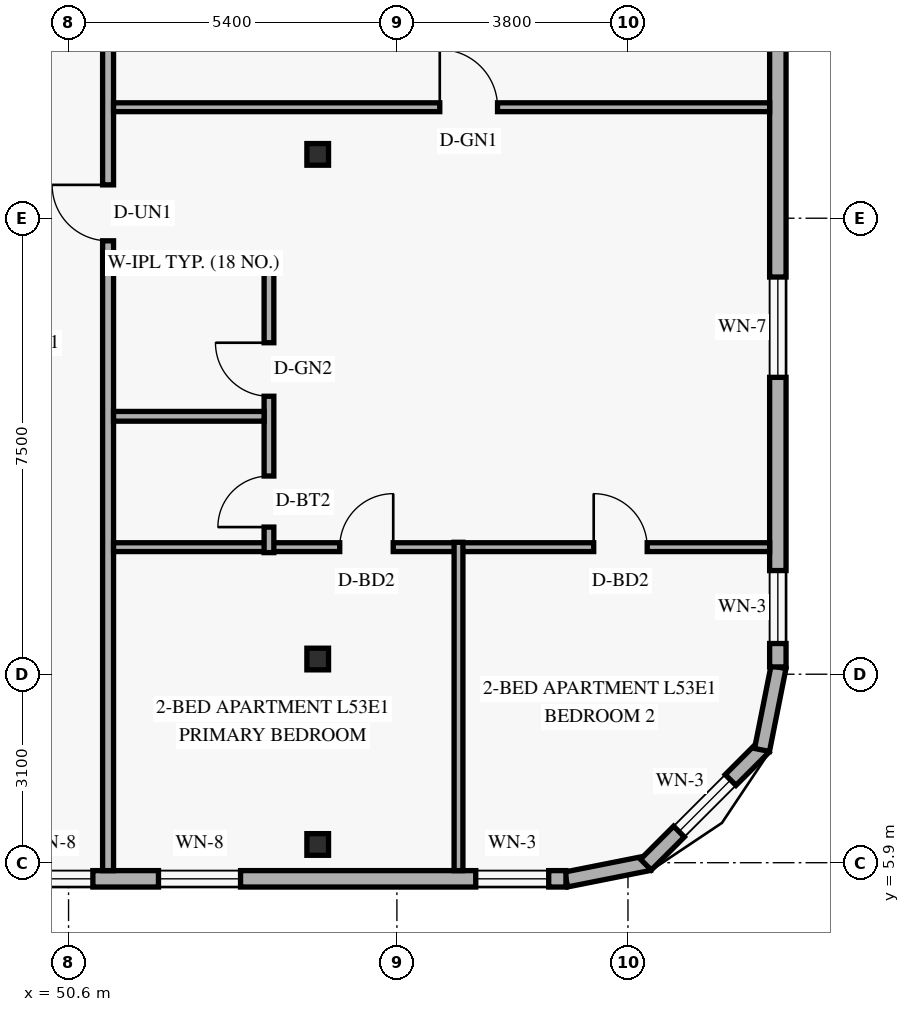
"""IFC4 building model, lengths in metres.
Left out: names, types, materials, properties, quantities, classifications, styles, units other than length and angle.
Written with IfcOpenShell. Run it as: python <this file> out.ifc"""

import sys

from ifc_helpers import new_model, si_unit, direction, frame, frame_2d, origin, origin_2d, place, context, subcontext, project, spatial, rectangle, hollow_rectangle, extrude, element, fill, save


model = new_model("IFC4")
c1 = context("Model", 3, precision=1e-05, world=origin(), true_north=direction((0.0, 1.0)))
c2 = subcontext(c1, "Body", "Model", "MODEL_VIEW")
j1 = project(units=[si_unit("LENGTHUNIT", "METRE"), si_unit("PLANEANGLEUNIT", "RADIAN")], contexts=[c1])
p1 = place(None, origin())
s1 = spatial("IfcSite", under=j1, at=p1, CompositionType="ELEMENT")
p2 = place(p1, origin())
s2 = spatial("IfcBuilding", under=s1, at=p2, CompositionType="ELEMENT")
p3 = place(p2, frame((0.0, 0.0, 205.8)))
s3 = spatial("IfcBuildingStorey", under=s2, at=p3, CompositionType="ELEMENT", Elevation=205.8)
for number, where, z_axis, x_axis in (
    (1, (54.593, 6.2, 0.0), (0.058, 0.0, 0.998), (0.0, 1.0, 0.0)),
    (2, (54.593, 9.25, 0.0), (0.058, 0.0, 0.998), (0.0, 1.0, 0.0)),
    (3, (54.593, 17.55, 0.0), (0.058, 0.0, 0.998), (0.0, 1.0, 0.0)),
):
    element("IfcColumn", number, at=place(p3, frame(where, z_axis=z_axis, x_axis=x_axis)), inside=s3, PredefinedType="COLUMN", context=c2, shape_type="SweptSolid", body=[
        extrude(hollow_rectangle(XDim=0.356, YDim=0.356, WallThickness=0.016, at=origin_2d()), origin(), (0.0, 0.0, 1.0), 3.606),
    ])
p4 = place(p3, frame((58.783, 5.624, 0.0), z_axis=(0.0, 0.0, 1.0), x_axis=(0.980809899341, 0.19496651342, 0.0)))
e4 = element("IfcWall", 4, at=p4, inside=s3, PredefinedType="SOLIDWALL", context=c2, shape_type="SweptSolid", body=[
    extrude(rectangle(XDim=1.389, YDim=0.25, at=frame_2d((0.694, 0.0))), origin(), (0.0, 0.0, 1.0), 3.36),
])
p5 = place(p3, frame((60.095, 5.868, 0.0), z_axis=(0.0, 0.0, 1.0), x_axis=(0.707106781187, 0.707106781187, 0.0)))
e5 = element("IfcWall", 5, at=p5, inside=s3, PredefinedType="SOLIDWALL", context=c2, shape_type="SweptSolid", body=[
    extrude(rectangle(XDim=2.739, YDim=0.25, at=frame_2d((1.37, 0.0))), origin(), (0.0, 0.0, 1.0), 3.36),
])
p6 = place(p5, frame((0.77, 0.0, 0.85)))
e6 = element("IfcOpeningElement", 6, at=p6, cuts=e5, PredefinedType="OPENING", context=c2, shape_type="SweptSolid", body=[
    extrude(rectangle(XDim=1.2, YDim=1.5, at=frame_2d((0.6, 0.75))), frame((0.0, 0.135, 0.0), z_axis=(0.0, -1.0, 0.0), x_axis=(1.0, 0.0, 0.0)), (0.0, 0.0, 1.0), 0.27),
])
p7 = place(p3, frame((62.005, 7.754, 0.0), z_axis=(0.0, 0.0, 1.0), x_axis=(0.195135625965, 0.9807762678, 0.0)))
e7 = element("IfcWall", 7, at=p7, inside=s3, PredefinedType="SOLIDWALL", context=c2, shape_type="SweptSolid", body=[
    extrude(rectangle(XDim=1.389, YDim=0.25, at=frame_2d((0.694, 0.0))), origin(), (0.0, 0.0, 1.0), 3.36),
])
p8 = place(p3, frame((25.82, 5.635, 0.0), z_axis=(0.0, 0.0, 1.0), x_axis=(1.0, 0.0, 0.0)))
e8 = element("IfcWall", 8, at=p8, inside=s3, PredefinedType="SOLIDWALL", context=c2, shape_type="SweptSolid", body=[
    extrude(rectangle(XDim=32.96, YDim=0.27, at=frame_2d((16.48, 0.0))), origin(), (0.0, 0.0, 1.0), 3.36),
])
p9 = place(p8, frame((3.795, 0.0, 0.85)))
e9 = element("IfcOpeningElement", 9, at=p9, cuts=e8, PredefinedType="OPENING", context=c2, shape_type="SweptSolid", body=[
    extrude(rectangle(XDim=1.35, YDim=1.55, at=frame_2d((0.675, 0.775))), frame((0.0, 0.145, 0.0), z_axis=(0.0, -1.0, 0.0), x_axis=(1.0, 0.0, 0.0)), (0.0, 0.0, 1.0), 0.29),
])
p10 = place(p8, frame((15.661, 0.0, 0.85)))
e10 = element("IfcOpeningElement", 10, at=p10, cuts=e8, PredefinedType="OPENING", context=c2, shape_type="SweptSolid", body=[
    extrude(rectangle(XDim=1.35, YDim=1.55, at=frame_2d((0.675, 0.775))), frame((0.0, 0.145, 0.0), z_axis=(0.0, -1.0, 0.0), x_axis=(1.0, 0.0, 0.0)), (0.0, 0.0, 1.0), 0.29),
])
p11 = place(p8, frame((23.83, 0.0, 0.85)))
e11 = element("IfcOpeningElement", 11, at=p11, cuts=e8, PredefinedType="OPENING", context=c2, shape_type="SweptSolid", body=[
    extrude(rectangle(XDim=1.35, YDim=1.55, at=frame_2d((0.675, 0.775))), frame((0.0, 0.145, 0.0), z_axis=(0.0, -1.0, 0.0), x_axis=(1.0, 0.0, 0.0)), (0.0, 0.0, 1.0), 0.29),
])
p12 = place(p8, frame((26.259, 0.0, 0.85)))
e12 = element("IfcOpeningElement", 12, at=p12, cuts=e8, PredefinedType="OPENING", context=c2, shape_type="SweptSolid", body=[
    extrude(rectangle(XDim=1.35, YDim=1.55, at=frame_2d((0.675, 0.775))), frame((0.0, 0.145, 0.0), z_axis=(0.0, -1.0, 0.0), x_axis=(1.0, 0.0, 0.0)), (0.0, 0.0, 1.0), 0.29),
])
p13 = place(p8, frame((31.477, 0.0, 0.85)))
e13 = element("IfcOpeningElement", 13, at=p13, cuts=e8, PredefinedType="OPENING", context=c2, shape_type="SweptSolid", body=[
    extrude(rectangle(XDim=1.2, YDim=1.5, at=frame_2d((0.6, 0.75))), frame((0.0, 0.145, 0.0), z_axis=(0.0, -1.0, 0.0), x_axis=(1.0, 0.0, 0.0)), (0.0, 0.0, 1.0), 0.29),
])
p14 = place(p3, frame((62.265, 9.12, 0.0), z_axis=(0.0, 0.0, 1.0), x_axis=(0.0, 1.0, 0.0)))
e14 = element("IfcWall", 14, at=p14, inside=s3, PredefinedType="SOLIDWALL", context=c2, shape_type="SweptSolid", body=[
    extrude(rectangle(XDim=29.76, YDim=0.27, at=frame_2d((14.88, 0.0))), origin(), (0.0, 0.0, 1.0), 3.36),
])
p15 = place(p14, frame((0.385, 0.0, 0.85)))
e15 = element("IfcOpeningElement", 15, at=p15, cuts=e14, PredefinedType="OPENING", context=c2, shape_type="SweptSolid", body=[
    extrude(rectangle(XDim=1.2, YDim=1.5, at=frame_2d((0.6, 0.75))), frame((0.0, 0.145, 0.0), z_axis=(0.0, -1.0, 0.0), x_axis=(1.0, 0.0, 0.0)), (0.0, 0.0, 1.0), 0.29),
])
p16 = place(p14, frame((4.763, 0.0, 0.85)))
e16 = element("IfcOpeningElement", 16, at=p16, cuts=e14, PredefinedType="OPENING", context=c2, shape_type="SweptSolid", body=[
    extrude(rectangle(XDim=1.65, YDim=1.6, at=frame_2d((0.825, 0.8))), frame((0.0, 0.145, 0.0), z_axis=(0.0, -1.0, 0.0), x_axis=(1.0, 0.0, 0.0)), (0.0, 0.0, 1.0), 0.29),
])
p17 = place(p14, frame((11.218, 0.0, 0.85)))
e17 = element("IfcOpeningElement", 17, at=p17, cuts=e14, PredefinedType="OPENING", context=c2, shape_type="SweptSolid", body=[
    extrude(rectangle(XDim=1.65, YDim=1.6, at=frame_2d((0.825, 0.8))), frame((0.0, 0.145, 0.0), z_axis=(0.0, -1.0, 0.0), x_axis=(1.0, 0.0, 0.0)), (0.0, 0.0, 1.0), 0.29),
])
p18 = place(p14, frame((16.99, 0.0, 0.85)))
e18 = element("IfcOpeningElement", 18, at=p18, cuts=e14, PredefinedType="OPENING", context=c2, shape_type="SweptSolid", body=[
    extrude(rectangle(XDim=1.65, YDim=1.6, at=frame_2d((0.825, 0.8))), frame((0.0, 0.145, 0.0), z_axis=(0.0, -1.0, 0.0), x_axis=(1.0, 0.0, 0.0)), (0.0, 0.0, 1.0), 0.29),
])
p19 = place(p14, frame((24.17, 0.0, 0.85)))
e19 = element("IfcOpeningElement", 19, at=p19, cuts=e14, PredefinedType="OPENING", context=c2, shape_type="SweptSolid", body=[
    extrude(rectangle(XDim=1.65, YDim=1.6, at=frame_2d((0.825, 0.8))), frame((0.0, 0.145, 0.0), z_axis=(0.0, -1.0, 0.0), x_axis=(1.0, 0.0, 0.0)), (0.0, 0.0, 1.0), 0.29),
])
p20 = place(p3, frame((51.25, 5.77, 0.0), z_axis=(0.0, 0.0, 1.0), x_axis=(0.0, 1.0, 0.0)))
e20 = element("IfcWall", 20, at=p20, inside=s3, PredefinedType="STANDARD", context=c2, shape_type="SweptSolid", body=[
    extrude(rectangle(XDim=36.46, YDim=0.18, at=frame_2d((18.23, 0.0))), origin(), (0.0, 0.0, 1.0), 2.803),
])
p21 = place(p20, frame((10.358, 0.0, 0.0)))
e21 = element("IfcOpeningElement", 21, at=p21, cuts=e20, PredefinedType="OPENING", context=c2, shape_type="SweptSolid", body=[
    extrude(rectangle(XDim=0.92, YDim=2.15, at=frame_2d((0.46, 1.075))), frame((0.0, 0.1, 0.0), z_axis=(0.0, -1.0, 0.0), x_axis=(1.0, 0.0, 0.0)), (0.0, 0.0, 1.0), 0.2),
])
p22 = place(p20, frame((26.583, 0.0, 0.0)))
e22 = element("IfcOpeningElement", 22, at=p22, cuts=e20, PredefinedType="OPENING", context=c2, shape_type="SweptSolid", body=[
    extrude(rectangle(XDim=0.92, YDim=2.15, at=frame_2d((0.46, 1.075))), frame((0.0, 0.1, 0.0), z_axis=(0.0, -1.0, 0.0), x_axis=(1.0, 0.0, 0.0)), (0.0, 0.0, 1.0), 0.2),
])
p23 = place(p3, frame((51.34, 11.09, 0.0), z_axis=(0.0, 0.0, 1.0), x_axis=(1.0, 0.0, 0.0)))
e23 = element("IfcWall", 23, at=p23, inside=s3, PredefinedType="PARTITIONING", context=c2, shape_type="SweptSolid", body=[
    extrude(rectangle(XDim=10.79, YDim=0.145, at=frame_2d((5.395, 0.0))), origin(), (0.0, 0.0, 1.0), 2.879),
])
p24 = place(p23, frame((3.719, 0.0, 0.0)))
e24 = element("IfcOpeningElement", 24, at=p24, cuts=e23, PredefinedType="OPENING", context=c2, shape_type="SweptSolid", body=[
    extrude(rectangle(XDim=0.88, YDim=2.14, at=frame_2d((0.44, 1.07))), frame((0.0, 0.083, 0.0), z_axis=(0.0, -1.0, 0.0), x_axis=(1.0, 0.0, 0.0)), (0.0, 0.0, 1.0), 0.165),
])
p25 = place(p23, frame((7.896, 0.0, 0.0)))
e25 = element("IfcOpeningElement", 25, at=p25, cuts=e23, PredefinedType="OPENING", context=c2, shape_type="SweptSolid", body=[
    extrude(rectangle(XDim=0.88, YDim=2.14, at=frame_2d((0.44, 1.07))), frame((0.0, 0.083, 0.0), z_axis=(0.0, -1.0, 0.0), x_axis=(1.0, 0.0, 0.0)), (0.0, 0.0, 1.0), 0.165),
])
p26 = place(p3, frame((51.34, 15.769, 0.0), z_axis=(0.0, 0.0, 1.0), x_axis=(1.0, 0.0, 0.0)))
e26 = element("IfcWall", 26, at=p26, inside=s3, PredefinedType="PLUMBINGWALL", context=c2, shape_type="SweptSolid", body=[
    extrude(rectangle(XDim=2.636, YDim=0.16, at=frame_2d((1.318, 0.0))), origin(), (0.0, 0.0, 1.0), 3.36),
])
p27 = place(p3, frame((53.896, 11.0, 0.0), z_axis=(0.0, 0.0, 1.0), x_axis=(0.0, 1.0, 0.0)))
e27 = element("IfcWall", 27, at=p27, inside=s3, PredefinedType="PLUMBINGWALL", context=c2, shape_type="SweptSolid", body=[
    extrude(rectangle(XDim=4.858, YDim=0.16, at=frame_2d((2.429, 0.0))), origin(), (0.0, 0.0, 1.0), 3.039),
])
p28 = place(p27, frame((0.42, 0.0, 0.0)))
e28 = element("IfcOpeningElement", 28, at=p28, cuts=e27, PredefinedType="OPENING", context=c2, shape_type="SweptSolid", body=[
    extrude(rectangle(XDim=0.84, YDim=2.12, at=frame_2d((0.42, 1.06))), frame((0.0, 0.09, 0.0), z_axis=(0.0, -1.0, 0.0), x_axis=(1.0, 0.0, 0.0)), (0.0, 0.0, 1.0), 0.18),
])
p29 = place(p27, frame((2.572, 0.0, 0.0)))
e29 = element("IfcOpeningElement", 29, at=p29, cuts=e27, PredefinedType="OPENING", context=c2, shape_type="SweptSolid", body=[
    extrude(rectangle(XDim=0.88, YDim=2.12, at=frame_2d((0.44, 1.06))), frame((0.0, 0.09, 0.0), z_axis=(0.0, -1.0, 0.0), x_axis=(1.0, 0.0, 0.0)), (0.0, 0.0, 1.0), 0.18),
])
p30 = place(p3, frame((51.34, 13.242, 0.0), z_axis=(0.0, 0.0, 1.0), x_axis=(1.0, 0.0, 0.0)))
e30 = element("IfcWall", 30, at=p30, inside=s3, PredefinedType="PLUMBINGWALL", context=c2, shape_type="SweptSolid", body=[
    extrude(rectangle(XDim=2.476, YDim=0.16, at=frame_2d((1.238, 0.0))), origin(), (0.0, 0.0, 1.0), 3.36),
])
p31 = place(p3, frame((51.34, 18.326, 0.0), z_axis=(0.0, 0.0, 1.0), x_axis=(1.0, 0.0, 0.0)))
e31 = element("IfcWall", 31, at=p31, inside=s3, PredefinedType="PARTITIONING", context=c2, shape_type="SweptSolid", body=[
    extrude(rectangle(XDim=10.79, YDim=0.145, at=frame_2d((5.395, 0.0))), origin(), (0.0, 0.0, 1.0), 2.879),
])
p32 = place(p31, frame((5.365, 0.0, 0.0)))
e32 = element("IfcOpeningElement", 32, at=p32, cuts=e31, PredefinedType="OPENING", context=c2, shape_type="SweptSolid", body=[
    extrude(rectangle(XDim=0.95, YDim=2.15, at=frame_2d((0.475, 1.075))), frame((0.0, 0.083, 0.0), z_axis=(0.0, -1.0, 0.0), x_axis=(1.0, 0.0, 0.0)), (0.0, 0.0, 1.0), 0.165),
])
p33 = place(p3, frame((57.013, 5.77, 0.0), z_axis=(0.0, 0.0, 1.0), x_axis=(0.0, 1.0, 0.0)))
e33 = element("IfcWall", 33, at=p33, inside=s3, PredefinedType="PARTITIONING", context=c2, shape_type="SweptSolid", body=[
    extrude(rectangle(XDim=5.4, YDim=0.145, at=frame_2d((2.7, 0.0))), origin(), (0.0, 0.0, 1.0), 3.36),
])
p34 = place(p6, origin())
e34 = element("IfcWindow", 34, at=p34, inside=s3, PartitioningType="SINGLE_PANEL", PredefinedType="WINDOW", context=c2, shape_type="SweptSolid", body=[
    extrude(rectangle(XDim=1.2, YDim=1.5, at=frame_2d((0.6, 0.75))), frame((0.0, 0.03, 0.0), z_axis=(0.0, -1.0, 0.0), x_axis=(1.0, 0.0, 0.0)), (0.0, 0.0, 1.0), 0.06),
])
fill(e6, e34)
p35 = place(p11, origin())
e35 = element("IfcWindow", 35, at=p35, inside=s3, PartitioningType="SINGLE_PANEL", PredefinedType="WINDOW", context=c2, shape_type="SweptSolid", body=[
    extrude(rectangle(XDim=1.35, YDim=1.55, at=frame_2d((0.675, 0.775))), frame((0.0, 0.03, 0.0), z_axis=(0.0, -1.0, 0.0), x_axis=(1.0, 0.0, 0.0)), (0.0, 0.0, 1.0), 0.06),
])
fill(e11, e35)
p36 = place(p12, origin())
e36 = element("IfcWindow", 36, at=p36, inside=s3, PartitioningType="SINGLE_PANEL", PredefinedType="WINDOW", context=c2, shape_type="SweptSolid", body=[
    extrude(rectangle(XDim=1.35, YDim=1.55, at=frame_2d((0.675, 0.775))), frame((0.0, 0.03, 0.0), z_axis=(0.0, -1.0, 0.0), x_axis=(1.0, 0.0, 0.0)), (0.0, 0.0, 1.0), 0.06),
])
fill(e12, e36)
p37 = place(p13, origin())
e37 = element("IfcWindow", 37, at=p37, inside=s3, PartitioningType="SINGLE_PANEL", PredefinedType="WINDOW", context=c2, shape_type="SweptSolid", body=[
    extrude(rectangle(XDim=1.2, YDim=1.5, at=frame_2d((0.6, 0.75))), frame((0.0, 0.03, 0.0), z_axis=(0.0, -1.0, 0.0), x_axis=(1.0, 0.0, 0.0)), (0.0, 0.0, 1.0), 0.06),
])
fill(e13, e37)
p38 = place(p15, origin())
e38 = element("IfcWindow", 38, at=p38, inside=s3, PartitioningType="SINGLE_PANEL", PredefinedType="WINDOW", context=c2, shape_type="SweptSolid", body=[
    extrude(rectangle(XDim=1.2, YDim=1.5, at=frame_2d((0.6, 0.75))), frame((0.0, 0.03, 0.0), z_axis=(0.0, -1.0, 0.0), x_axis=(1.0, 0.0, 0.0)), (0.0, 0.0, 1.0), 0.06),
])
fill(e15, e38)
p39 = place(p16, origin())
e39 = element("IfcWindow", 39, at=p39, inside=s3, PartitioningType="SINGLE_PANEL", PredefinedType="WINDOW", context=c2, shape_type="SweptSolid", body=[
    extrude(rectangle(XDim=1.65, YDim=1.6, at=frame_2d((0.825, 0.8))), frame((0.0, 0.03, 0.0), z_axis=(0.0, -1.0, 0.0), x_axis=(1.0, 0.0, 0.0)), (0.0, 0.0, 1.0), 0.06),
])
fill(e16, e39)
p40 = place(p32, origin())
e40 = element("IfcDoor", 40, at=p40, inside=s3, OperationType="SINGLE_SWING_LEFT", PredefinedType="DOOR", context=c2, shape_type="SweptSolid", body=[
    extrude(rectangle(XDim=0.95, YDim=2.15, at=frame_2d((0.475, 1.075))), frame((0.0, 0.025, 0.0), z_axis=(0.0, -1.0, 0.0), x_axis=(1.0, 0.0, 0.0)), (0.0, 0.0, 1.0), 0.05),
])
fill(e32, e40)
p41 = place(p21, origin())
e41 = element("IfcDoor", 41, at=p41, inside=s3, OperationType="SINGLE_SWING_RIGHT", PredefinedType="DOOR", context=c2, shape_type="SweptSolid", body=[
    extrude(rectangle(XDim=0.92, YDim=2.15, at=frame_2d((0.46, 1.075))), frame((0.0, 0.025, 0.0), z_axis=(0.0, -1.0, 0.0), x_axis=(1.0, 0.0, 0.0)), (0.0, 0.0, 1.0), 0.05),
])
fill(e21, e41)
p42 = place(p28, origin())
e42 = element("IfcDoor", 42, at=p42, inside=s3, OperationType="SINGLE_SWING_LEFT", PredefinedType="DOOR", context=c2, shape_type="SweptSolid", body=[
    extrude(rectangle(XDim=0.84, YDim=2.12, at=frame_2d((0.42, 1.06))), frame((0.0, 0.025, 0.0), z_axis=(0.0, -1.0, 0.0), x_axis=(1.0, 0.0, 0.0)), (0.0, 0.0, 1.0), 0.05),
])
fill(e28, e42)
p43 = place(p29, origin())
e43 = element("IfcDoor", 43, at=p43, inside=s3, OperationType="SINGLE_SWING_RIGHT", PredefinedType="DOOR", context=c2, shape_type="SweptSolid", body=[
    extrude(rectangle(XDim=0.88, YDim=2.12, at=frame_2d((0.44, 1.06))), frame((0.0, 0.025, 0.0), z_axis=(0.0, -1.0, 0.0), x_axis=(1.0, 0.0, 0.0)), (0.0, 0.0, 1.0), 0.05),
])
fill(e29, e43)
p44 = place(p24, origin())
e44 = element("IfcDoor", 44, at=p44, inside=s3, OperationType="SINGLE_SWING_RIGHT", PredefinedType="DOOR", context=c2, shape_type="SweptSolid", body=[
    extrude(rectangle(XDim=0.88, YDim=2.14, at=frame_2d((0.44, 1.07))), frame((0.0, 0.025, 0.0), z_axis=(0.0, -1.0, 0.0), x_axis=(1.0, 0.0, 0.0)), (0.0, 0.0, 1.0), 0.05),
])
fill(e24, e44)
p45 = place(p25, origin())
e45 = element("IfcDoor", 45, at=p45, inside=s3, OperationType="SINGLE_SWING_LEFT", PredefinedType="DOOR", context=c2, shape_type="SweptSolid", body=[
    extrude(rectangle(XDim=0.88, YDim=2.14, at=frame_2d((0.44, 1.07))), frame((0.0, 0.025, 0.0), z_axis=(0.0, -1.0, 0.0), x_axis=(1.0, 0.0, 0.0)), (0.0, 0.0, 1.0), 0.05),
])
fill(e25, e45)
save(model, sys.argv[1])
